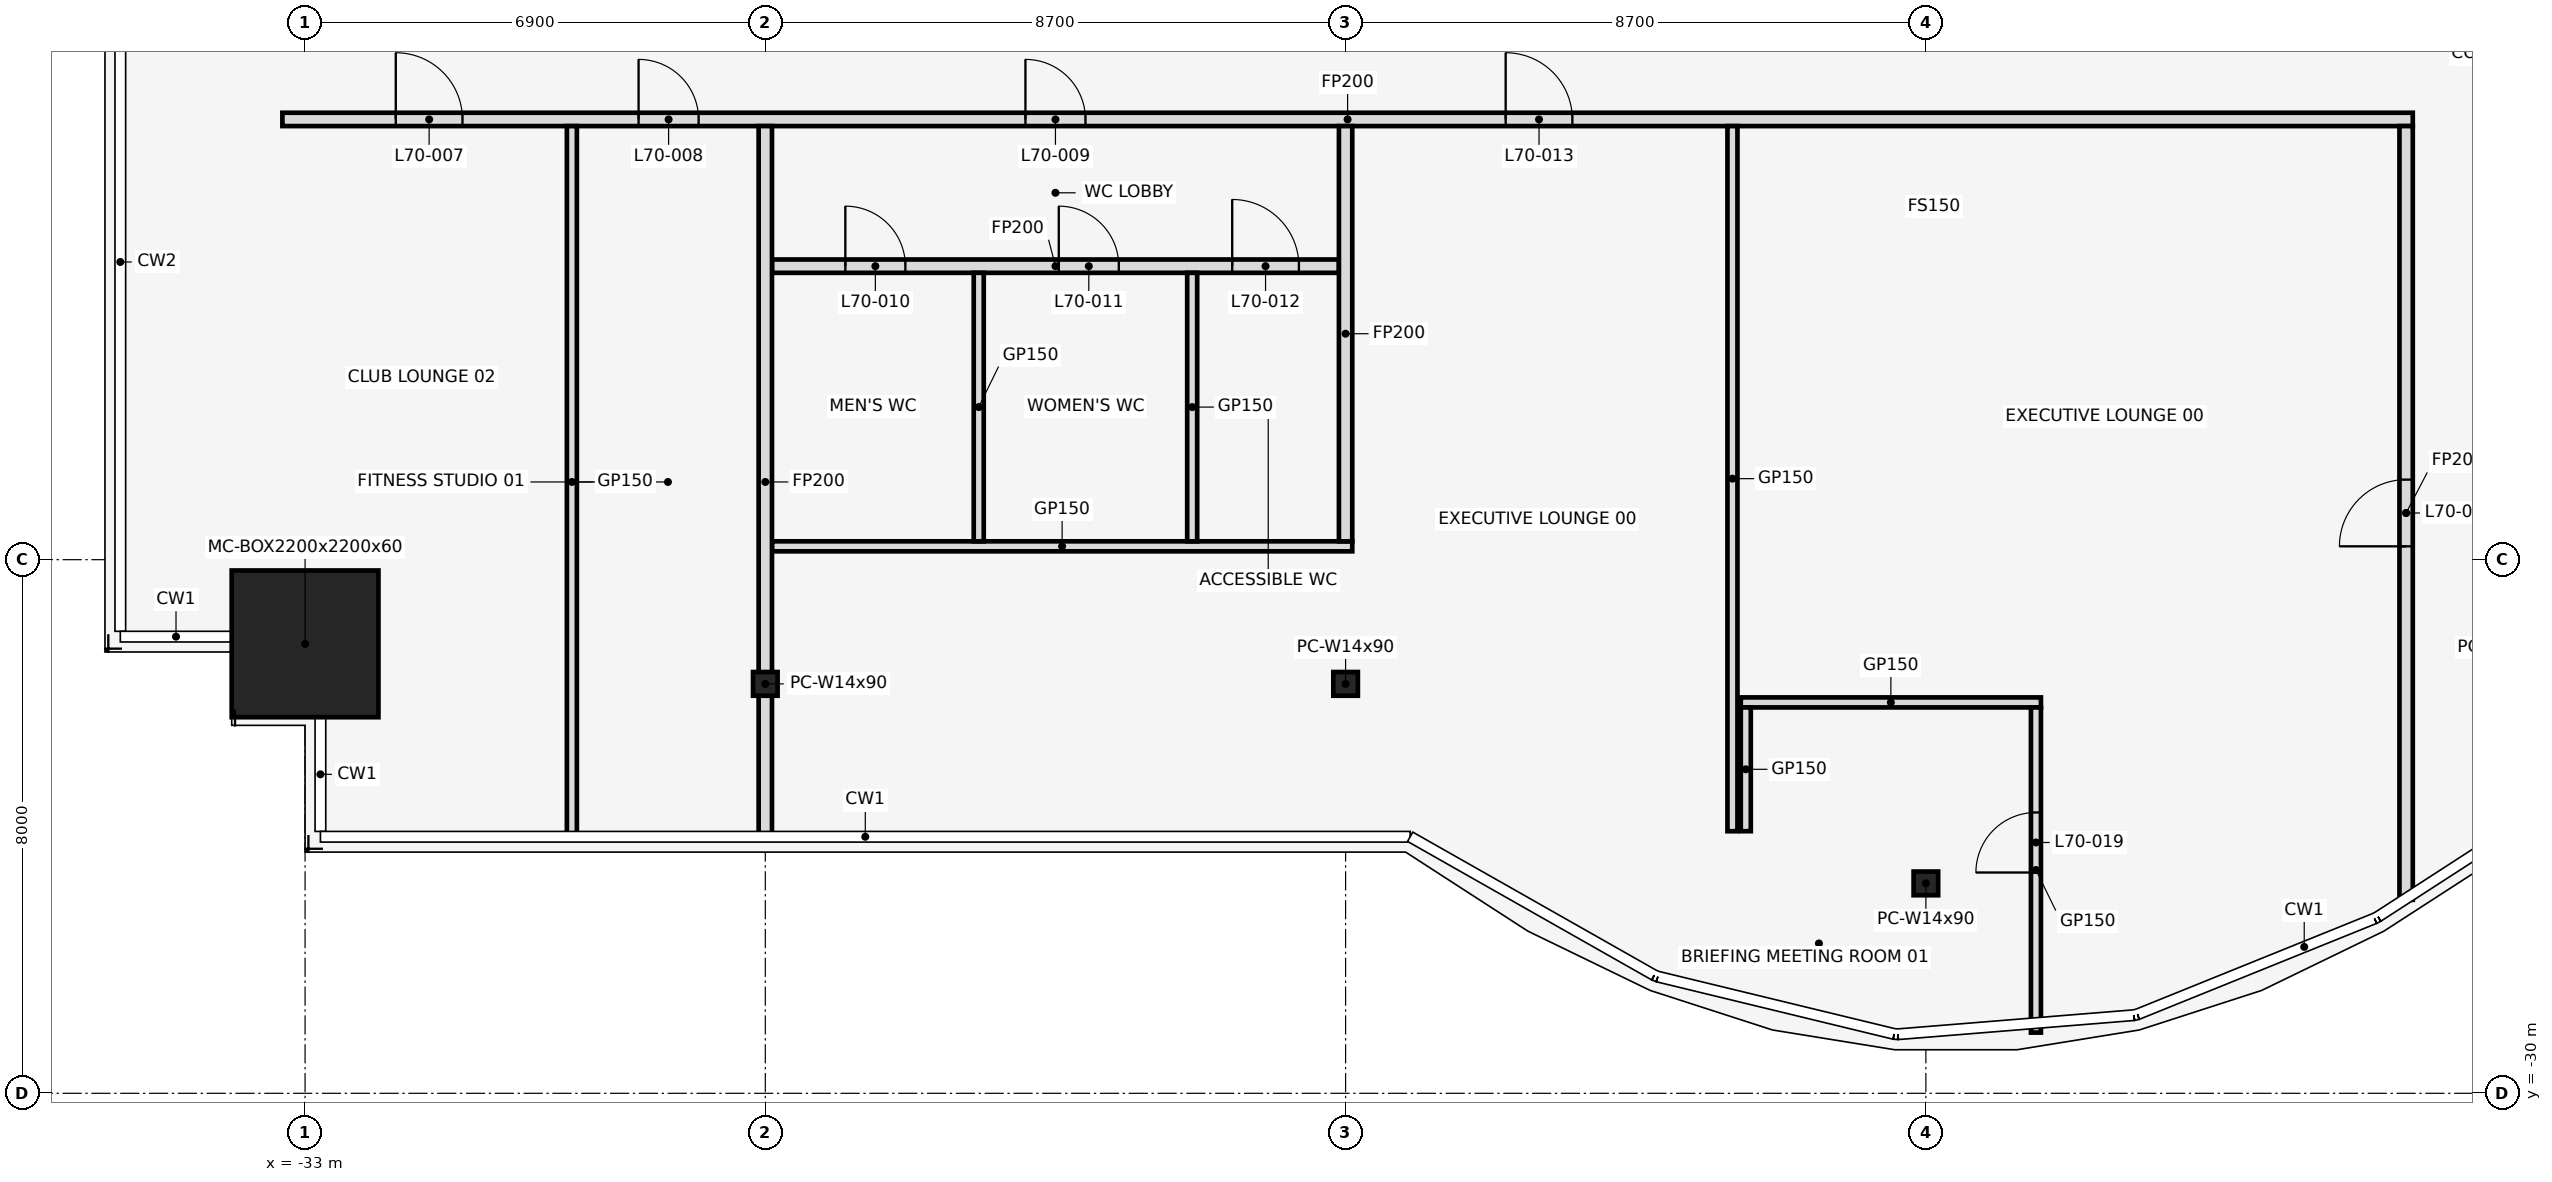
"""IFC4 building model, lengths in metres.
Left out: names, types, materials, properties, quantities, classifications, styles, units other than length and angle.
Written with IfcOpenShell. Run it as: python <this file> out.ifc"""

import sys

from ifc_helpers import new_model, si_unit, direction, frame, frame_2d, origin, origin_2d, place, context, subcontext, project, spatial, rectangle, hollow_rectangle, i_section, extrude, element, fill, save


model = new_model("IFC4")
c1 = context("Model", 3, precision=1e-05, world=origin(), true_north=direction((0.0, 1.0)))
c2 = subcontext(c1, "Body", "Model", "MODEL_VIEW")
j1 = project(units=[si_unit("LENGTHUNIT", "METRE"), si_unit("PLANEANGLEUNIT", "RADIAN")], contexts=[c1])
p1 = place(None, origin())
s1 = spatial("IfcSite", under=j1, at=p1, CompositionType="ELEMENT")
p2 = place(p1, origin())
s2 = spatial("IfcBuilding", under=s1, at=p2, CompositionType="ELEMENT")
p3 = place(p2, frame((0.0, 0.0, 311.0)))
s3 = spatial("IfcBuildingStorey", under=s2, at=p3, CompositionType="ELEMENT", Elevation=311.0)
p4 = place(p3, frame((-33.0, -23.262, 0.0), z_axis=(0.0, 0.0, 1.0), x_axis=(1.0, 0.0, 0.0)))
e1 = element("IfcColumn", 1, at=p4, inside=s3, PredefinedType="COLUMN", context=c2, shape_type="SweptSolid", body=[
    extrude(hollow_rectangle(XDim=2.2, YDim=2.2, WallThickness=0.06, at=origin_2d()), origin(), (0.0, 0.0, 1.0), 4.5),
])
for number, where, z_axis, x_axis in (
    (2, (-26.1, -23.862, 0.0), (0.0, 0.0, 1.0), (1.0, 0.0, 0.0)),
    (3, (-17.4, -23.862, 0.0), (0.0, 0.0, 1.0), (1.0, 0.0, 0.0)),
    (4, (-8.7, -26.853, 0.0), (0.0, 0.0, 1.0), (1.0, 0.0, 0.0)),
):
    element("IfcColumn", number, at=place(p3, frame(where, z_axis=z_axis, x_axis=x_axis)), inside=s3, PredefinedType="COLUMN", context=c2, shape_type="SweptSolid", body=[
        extrude(i_section(OverallWidth=0.368, OverallDepth=0.356, WebThickness=0.011, FlangeThickness=0.018, at=origin_2d()), origin(), (0.0, 0.0, 1.0), 4.5),
    ])
p5 = place(p3, frame((-11.475, -24.14, 0.0), z_axis=(0.0, 0.0, 1.0), x_axis=(1.0, 0.0, 0.0)))
e5 = element("IfcWall", 5, at=p5, inside=s3, PredefinedType="PARTITIONING", context=c2, shape_type="SweptSolid", body=[
    extrude(rectangle(XDim=4.5, YDim=0.15, at=frame_2d((2.25, 0.0))), origin(), (0.0, 0.0, 1.0), 3.418),
])
p6 = place(p3, frame((-26.0, -21.8, 0.0), z_axis=(0.0, 0.0, 1.0), x_axis=(1.0, 0.0, 0.0)))
e6 = element("IfcWall", 6, at=p6, inside=s3, PredefinedType="PARTITIONING", context=c2, shape_type="SweptSolid", body=[
    extrude(rectangle(XDim=8.7, YDim=0.15, at=frame_2d((4.35, 0.0))), origin(), (0.0, 0.0, 1.0), 3.418),
])
p7 = place(p3, frame((-26.0, -17.6, 0.0), z_axis=(0.0, 0.0, 1.0), x_axis=(1.0, 0.0, 0.0)))
e7 = element("IfcWall", 7, at=p7, inside=s3, PredefinedType="PARTITIONING", context=c2, shape_type="SweptSolid", body=[
    extrude(rectangle(XDim=8.5, YDim=0.2, at=frame_2d((4.25, 0.0))), origin(), (0.0, 0.0, 1.0), 3.418),
])
p8 = place(p7, frame((1.1, 0.0, 0.0)))
e8 = element("IfcOpeningElement", 8, at=p8, cuts=e7, PredefinedType="OPENING", context=c2, shape_type="SweptSolid", body=[
    extrude(rectangle(XDim=0.9, YDim=2.1, at=frame_2d((0.45, 1.05))), frame((0.0, 0.112, 0.0), z_axis=(0.0, -1.0, 0.0), x_axis=(1.0, 0.0, 0.0)), (0.0, 0.0, 1.0), 0.224),
])
p9 = place(p7, frame((4.3, 0.0, 0.0)))
e9 = element("IfcOpeningElement", 9, at=p9, cuts=e7, PredefinedType="OPENING", context=c2, shape_type="SweptSolid", body=[
    extrude(rectangle(XDim=0.9, YDim=2.1, at=frame_2d((0.45, 1.05))), frame((0.0, 0.112, 0.0), z_axis=(0.0, -1.0, 0.0), x_axis=(1.0, 0.0, 0.0)), (0.0, 0.0, 1.0), 0.224),
])
p10 = place(p7, frame((6.9, 0.0, 0.0)))
e10 = element("IfcOpeningElement", 10, at=p10, cuts=e7, PredefinedType="OPENING", context=c2, shape_type="SweptSolid", body=[
    extrude(rectangle(XDim=1.0, YDim=2.1, at=frame_2d((0.5, 1.05))), frame((0.0, 0.112, 0.0), z_axis=(0.0, -1.0, 0.0), x_axis=(1.0, 0.0, 0.0)), (0.0, 0.0, 1.0), 0.224),
])
p11 = place(p3, frame((-33.34, -15.4, 0.0), z_axis=(0.0, 0.0, 1.0), x_axis=(1.0, 0.0, 0.0)))
e11 = element("IfcWall", 11, at=p11, inside=s3, PredefinedType="PARTITIONING", context=c2, shape_type="SweptSolid", body=[
    extrude(rectangle(XDim=31.94, YDim=0.2, at=frame_2d((15.97, 0.0))), origin(), (0.0, 0.0, 1.0), 3.418),
])
p12 = place(p11, frame((1.7, 0.0, 0.0)))
e12 = element("IfcOpeningElement", 12, at=p12, cuts=e11, PredefinedType="OPENING", context=c2, shape_type="SweptSolid", body=[
    extrude(rectangle(XDim=1.0, YDim=2.1, at=frame_2d((0.5, 1.05))), frame((0.0, 0.112, 0.0), z_axis=(0.0, -1.0, 0.0), x_axis=(1.0, 0.0, 0.0)), (0.0, 0.0, 1.0), 0.224),
])
p13 = place(p11, frame((5.34, 0.0, 0.0)))
e13 = element("IfcOpeningElement", 13, at=p13, cuts=e11, PredefinedType="OPENING", context=c2, shape_type="SweptSolid", body=[
    extrude(rectangle(XDim=0.9, YDim=2.1, at=frame_2d((0.45, 1.05))), frame((0.0, 0.112, 0.0), z_axis=(0.0, -1.0, 0.0), x_axis=(1.0, 0.0, 0.0)), (0.0, 0.0, 1.0), 0.224),
])
p14 = place(p11, frame((11.14, 0.0, 0.0)))
e14 = element("IfcOpeningElement", 14, at=p14, cuts=e11, PredefinedType="OPENING", context=c2, shape_type="SweptSolid", body=[
    extrude(rectangle(XDim=0.9, YDim=2.1, at=frame_2d((0.45, 1.05))), frame((0.0, 0.112, 0.0), z_axis=(0.0, -1.0, 0.0), x_axis=(1.0, 0.0, 0.0)), (0.0, 0.0, 1.0), 0.224),
])
p15 = place(p11, frame((18.34, 0.0, 0.0)))
e15 = element("IfcOpeningElement", 15, at=p15, cuts=e11, PredefinedType="OPENING", context=c2, shape_type="SweptSolid", body=[
    extrude(rectangle(XDim=1.0, YDim=2.1, at=frame_2d((0.5, 1.05))), frame((0.0, 0.112, 0.0), z_axis=(0.0, -1.0, 0.0), x_axis=(1.0, 0.0, 0.0)), (0.0, 0.0, 1.0), 0.224),
])
p16 = place(p3, frame((-29.0, -26.17, 0.0), z_axis=(0.0, 0.0, 1.0), x_axis=(0.0, 1.0, 0.0)))
e16 = element("IfcWall", 16, at=p16, inside=s3, PredefinedType="PARTITIONING", context=c2, shape_type="SweptSolid", body=[
    extrude(rectangle(XDim=10.67, YDim=0.15, at=frame_2d((5.335, 0.0))), origin(), (0.0, 0.0, 1.0), 3.418),
])
p17 = place(p3, frame((-26.1, -26.17, 0.0), z_axis=(0.0, 0.0, 1.0), x_axis=(0.0, 1.0, 0.0)))
e17 = element("IfcWall", 17, at=p17, inside=s3, PredefinedType="PARTITIONING", context=c2, shape_type="SweptSolid", body=[
    extrude(rectangle(XDim=10.67, YDim=0.2, at=frame_2d((5.335, 0.0))), origin(), (0.0, 0.0, 1.0), 3.418),
])
for number, where, z_axis, x_axis in (
    (18, (-22.9, -21.725, 0.0), (0.0, 0.0, 1.0), (0.0, 1.0, 0.0)),
    (19, (-19.7, -21.725, 0.0), (0.0, 0.0, 1.0), (0.0, 1.0, 0.0)),
):
    element("IfcWall", number, at=place(p3, frame(where, z_axis=z_axis, x_axis=x_axis)), inside=s3, PredefinedType="PARTITIONING", context=c2, shape_type="SweptSolid", body=[
        extrude(rectangle(XDim=4.025, YDim=0.15, at=frame_2d((2.013, 0.0))), origin(), (0.0, 0.0, 1.0), 3.418),
    ])
p18 = place(p3, frame((-17.4, -21.725, 0.0), z_axis=(0.0, 0.0, 1.0), x_axis=(0.0, 1.0, 0.0)))
e20 = element("IfcWall", 20, at=p18, inside=s3, PredefinedType="PARTITIONING", context=c2, shape_type="SweptSolid", body=[
    extrude(rectangle(XDim=6.225, YDim=0.2, at=frame_2d((3.113, 0.0))), origin(), (0.0, 0.0, 1.0), 3.418),
])
p19 = place(p3, frame((-11.6, -26.071, 0.0), z_axis=(0.0, 0.0, 1.0), x_axis=(0.0, 1.0, 0.0)))
e21 = element("IfcWall", 21, at=p19, inside=s3, PredefinedType="PARTITIONING", context=c2, shape_type="SweptSolid", body=[
    extrude(rectangle(XDim=10.571, YDim=0.15, at=frame_2d((5.286, 0.0))), origin(), (0.0, 0.0, 1.0), 3.418),
])
p20 = place(p3, frame((-11.4, -26.071, 0.0), z_axis=(0.0, 0.0, 1.0), x_axis=(0.0, 1.0, 0.0)))
e22 = element("IfcWall", 22, at=p20, inside=s3, PredefinedType="PARTITIONING", context=c2, shape_type="SweptSolid", body=[
    extrude(rectangle(XDim=1.855, YDim=0.15, at=frame_2d((0.928, 0.0))), origin(), (0.0, 0.0, 1.0), 3.418),
])
p21 = place(p3, frame((-7.05, -29.09, 0.0), z_axis=(0.0, 0.0, 1.0), x_axis=(0.0, 1.0, 0.0)))
e23 = element("IfcWall", 23, at=p21, inside=s3, PredefinedType="PARTITIONING", context=c2, shape_type="SweptSolid", body=[
    extrude(rectangle(XDim=4.875, YDim=0.15, at=frame_2d((2.438, 0.0))), origin(), (0.0, 0.0, 1.0), 3.418),
])
p22 = place(p21, frame((2.4, 0.0, 0.0)))
e24 = element("IfcOpeningElement", 24, at=p22, cuts=e23, PredefinedType="OPENING", context=c2, shape_type="SweptSolid", body=[
    extrude(rectangle(XDim=0.9, YDim=2.1, at=frame_2d((0.45, 1.05))), frame((0.0, 0.087, 0.0), z_axis=(0.0, -1.0, 0.0), x_axis=(1.0, 0.0, 0.0)), (0.0, 0.0, 1.0), 0.174),
])
p23 = place(p3, frame((-1.5, -27.1, 0.0), z_axis=(0.0, 0.0, 1.0), x_axis=(0.0, 1.0, 0.0)))
e25 = element("IfcWall", 25, at=p23, inside=s3, PredefinedType="PARTITIONING", context=c2, shape_type="SweptSolid", body=[
    extrude(rectangle(XDim=11.6, YDim=0.2, at=frame_2d((5.8, 0.0))), origin(), (0.0, 0.0, 1.0), 3.418),
])
p24 = place(p23, frame((5.3, 0.0, 0.0)))
e26 = element("IfcOpeningElement", 26, at=p24, cuts=e25, PredefinedType="OPENING", context=c2, shape_type="SweptSolid", body=[
    extrude(rectangle(XDim=1.0, YDim=2.1, at=frame_2d((0.5, 1.05))), frame((0.0, 0.112, 0.0), z_axis=(0.0, -1.0, 0.0), x_axis=(1.0, 0.0, 0.0)), (0.0, 0.0, 1.0), 0.224),
])
p25 = place(p12, frame((1.0, 0.0, 0.0), z_axis=(0.0, 0.0, 1.0), x_axis=(-1.0, 0.0, 0.0)))
e27 = element("IfcDoor", 27, at=p25, inside=s3, OperationType="SINGLE_SWING_LEFT", PredefinedType="DOOR", context=c2, shape_type="SweptSolid", body=[
    extrude(rectangle(XDim=1.0, YDim=2.1, at=frame_2d((0.5, 1.05))), frame((0.0, 0.025, 0.0), z_axis=(0.0, -1.0, 0.0), x_axis=(1.0, 0.0, 0.0)), (0.0, 0.0, 1.0), 0.05),
])
fill(e12, e27)
p26 = place(p13, frame((0.9, 0.0, 0.0), z_axis=(0.0, 0.0, 1.0), x_axis=(-1.0, 0.0, 0.0)))
e28 = element("IfcDoor", 28, at=p26, inside=s3, OperationType="SINGLE_SWING_RIGHT", PredefinedType="DOOR", context=c2, shape_type="SweptSolid", body=[
    extrude(rectangle(XDim=0.9, YDim=2.1, at=frame_2d((0.45, 1.05))), frame((0.0, 0.025, 0.0), z_axis=(0.0, -1.0, 0.0), x_axis=(1.0, 0.0, 0.0)), (0.0, 0.0, 1.0), 0.05),
])
fill(e13, e28)
p27 = place(p14, frame((0.9, 0.0, 0.0), z_axis=(0.0, 0.0, 1.0), x_axis=(-1.0, 0.0, 0.0)))
e29 = element("IfcDoor", 29, at=p27, inside=s3, OperationType="SINGLE_SWING_RIGHT", PredefinedType="DOOR", context=c2, shape_type="SweptSolid", body=[
    extrude(rectangle(XDim=0.9, YDim=2.1, at=frame_2d((0.45, 1.05))), frame((0.0, 0.025, 0.0), z_axis=(0.0, -1.0, 0.0), x_axis=(1.0, 0.0, 0.0)), (0.0, 0.0, 1.0), 0.05),
])
fill(e14, e29)
p28 = place(p8, frame((0.9, 0.0, 0.0), z_axis=(0.0, 0.0, 1.0), x_axis=(-1.0, 0.0, 0.0)))
e30 = element("IfcDoor", 30, at=p28, inside=s3, OperationType="SINGLE_SWING_LEFT", PredefinedType="DOOR", context=c2, shape_type="SweptSolid", body=[
    extrude(rectangle(XDim=0.9, YDim=2.1, at=frame_2d((0.45, 1.05))), frame((0.0, 0.025, 0.0), z_axis=(0.0, -1.0, 0.0), x_axis=(1.0, 0.0, 0.0)), (0.0, 0.0, 1.0), 0.05),
])
fill(e8, e30)
p29 = place(p9, frame((0.9, 0.0, 0.0), z_axis=(0.0, 0.0, 1.0), x_axis=(-1.0, 0.0, 0.0)))
e31 = element("IfcDoor", 31, at=p29, inside=s3, OperationType="SINGLE_SWING_RIGHT", PredefinedType="DOOR", context=c2, shape_type="SweptSolid", body=[
    extrude(rectangle(XDim=0.9, YDim=2.1, at=frame_2d((0.45, 1.05))), frame((0.0, 0.025, 0.0), z_axis=(0.0, -1.0, 0.0), x_axis=(1.0, 0.0, 0.0)), (0.0, 0.0, 1.0), 0.05),
])
fill(e9, e31)
p30 = place(p10, frame((1.0, 0.0, 0.0), z_axis=(0.0, 0.0, 1.0), x_axis=(-1.0, 0.0, 0.0)))
e32 = element("IfcDoor", 32, at=p30, inside=s3, OperationType="SINGLE_SWING_RIGHT", PredefinedType="DOOR", context=c2, shape_type="SweptSolid", body=[
    extrude(rectangle(XDim=1.0, YDim=2.1, at=frame_2d((0.5, 1.05))), frame((0.0, 0.025, 0.0), z_axis=(0.0, -1.0, 0.0), x_axis=(1.0, 0.0, 0.0)), (0.0, 0.0, 1.0), 0.05),
])
fill(e10, e32)
p31 = place(p15, frame((1.0, 0.0, 0.0), z_axis=(0.0, 0.0, 1.0), x_axis=(-1.0, 0.0, 0.0)))
e33 = element("IfcDoor", 33, at=p31, inside=s3, OperationType="SINGLE_SWING_LEFT", PredefinedType="DOOR", context=c2, shape_type="SweptSolid", body=[
    extrude(rectangle(XDim=1.0, YDim=2.1, at=frame_2d((0.5, 1.05))), frame((0.0, 0.025, 0.0), z_axis=(0.0, -1.0, 0.0), x_axis=(1.0, 0.0, 0.0)), (0.0, 0.0, 1.0), 0.05),
])
fill(e15, e33)
p32 = place(p24, origin())
e34 = element("IfcDoor", 34, at=p32, inside=s3, OperationType="SINGLE_SWING_LEFT", PredefinedType="DOOR", context=c2, shape_type="SweptSolid", body=[
    extrude(rectangle(XDim=1.0, YDim=2.1, at=frame_2d((0.5, 1.05))), frame((0.0, 0.025, 0.0), z_axis=(0.0, -1.0, 0.0), x_axis=(1.0, 0.0, 0.0)), (0.0, 0.0, 1.0), 0.05),
])
fill(e26, e34)
p33 = place(p22, origin())
e35 = element("IfcDoor", 35, at=p33, inside=s3, OperationType="SINGLE_SWING_LEFT", PredefinedType="DOOR", context=c2, shape_type="SweptSolid", body=[
    extrude(rectangle(XDim=0.9, YDim=2.1, at=frame_2d((0.45, 1.05))), frame((0.0, 0.025, 0.0), z_axis=(0.0, -1.0, 0.0), x_axis=(1.0, 0.0, 0.0)), (0.0, 0.0, 1.0), 0.05),
])
fill(e24, e35)
save(model, sys.argv[1])
